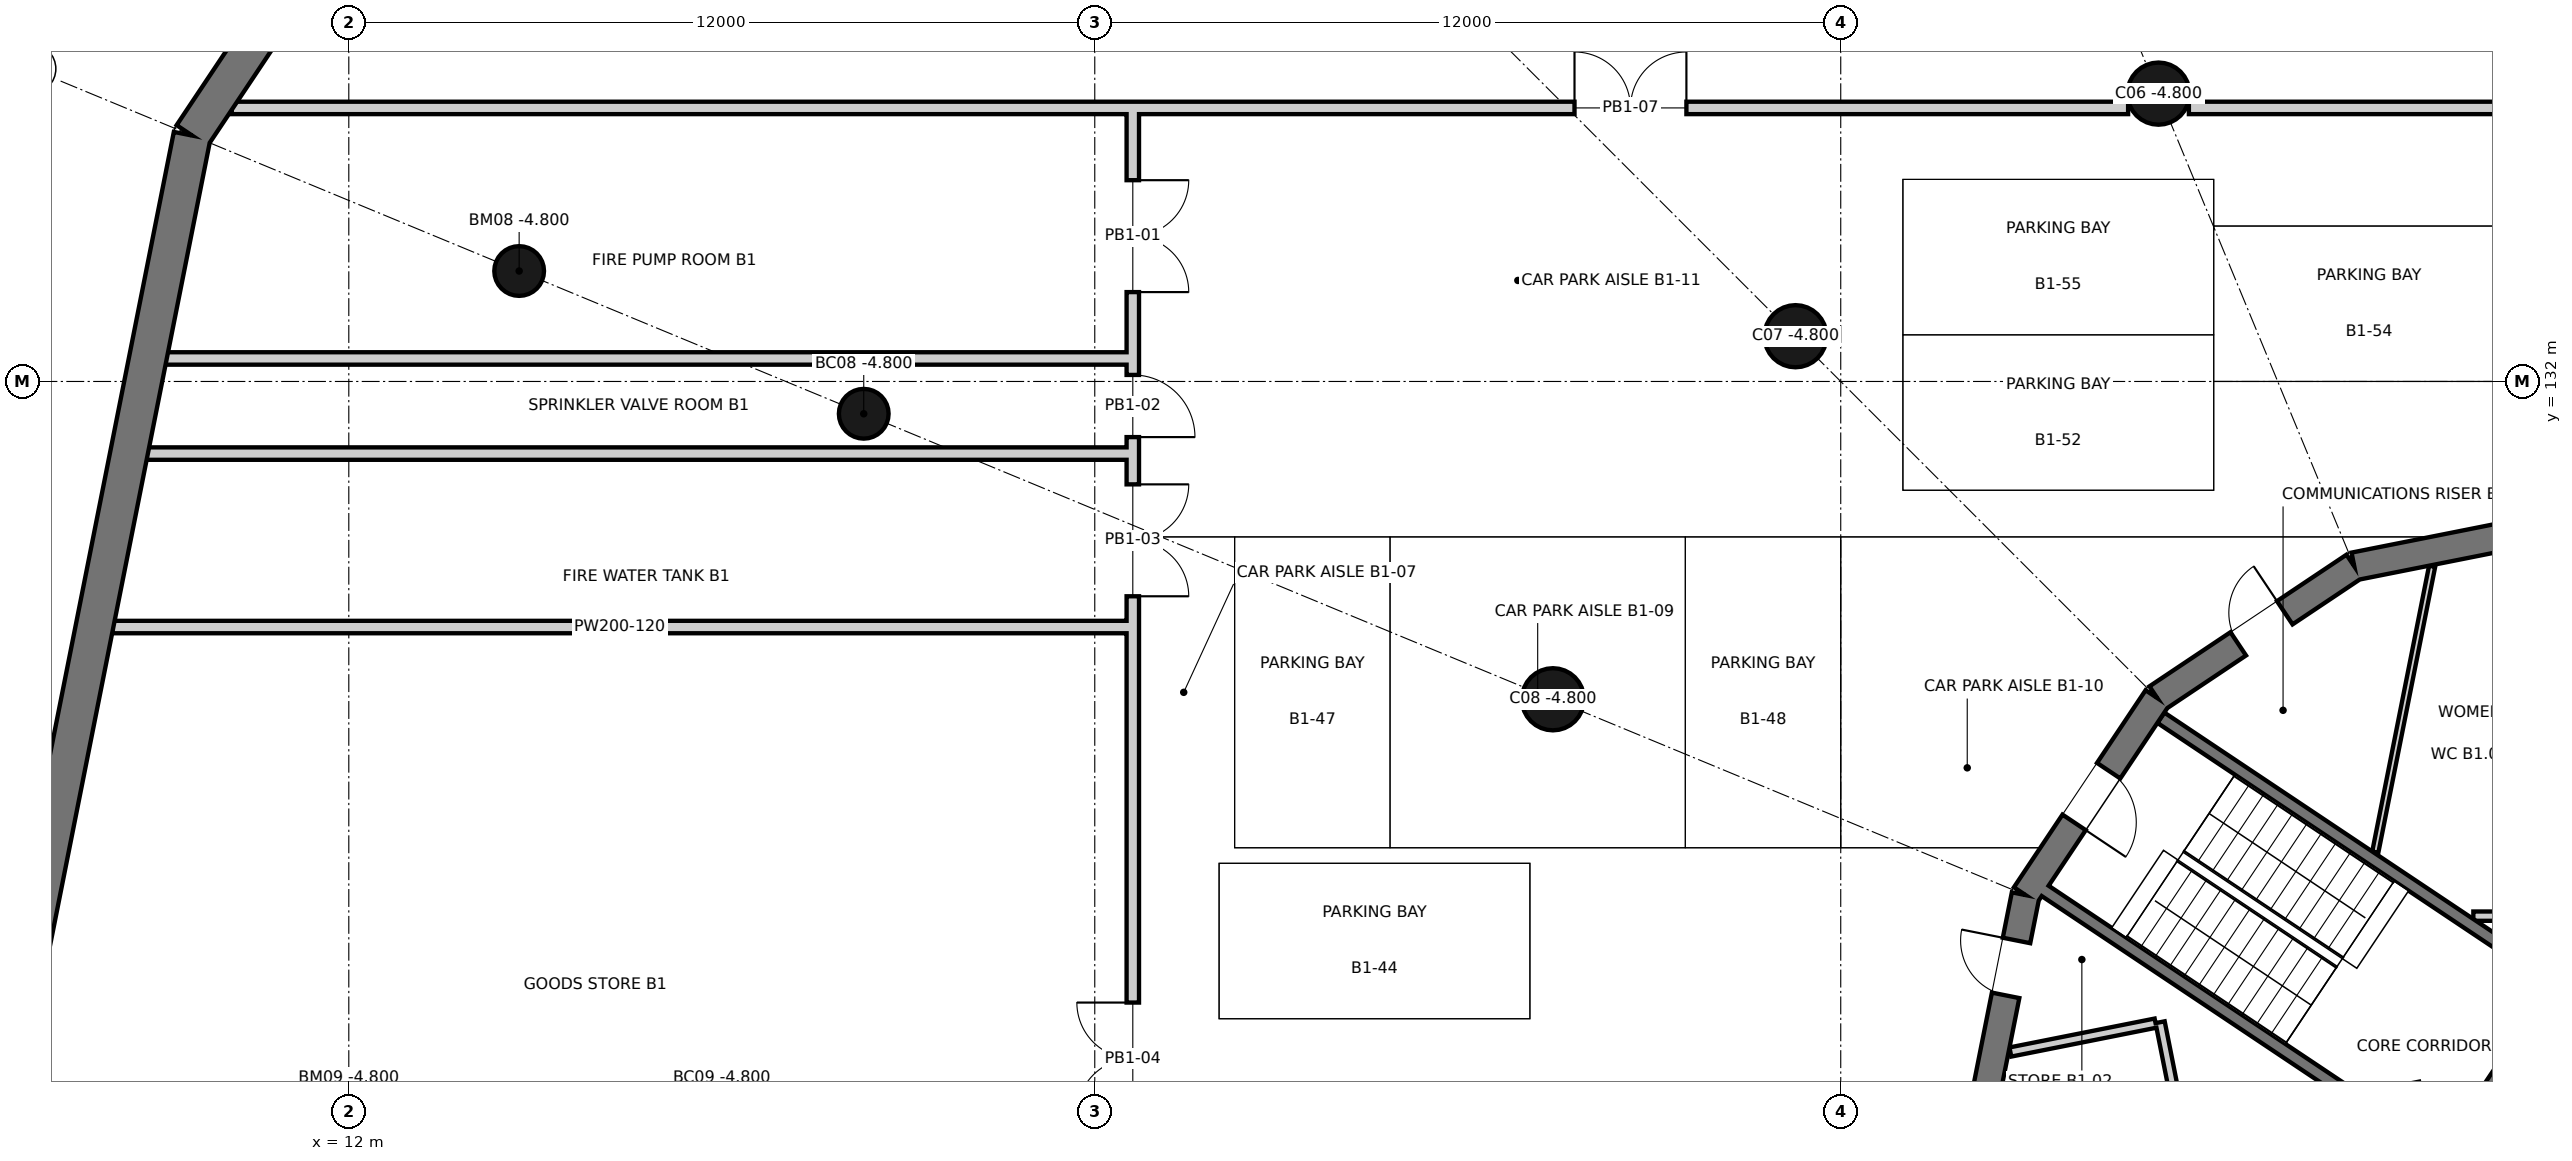
"""IFC4 building model, lengths in metres.
Left out: names, types, materials, properties, quantities, classifications, styles, units other than length and angle.
Written with IfcOpenShell. Run it as: python <this file> out.ifc"""

import sys

from ifc_helpers import new_model, si_unit, direction, frame, frame_2d, origin, origin_2d, place, context, subcontext, project, spatial, polyline, rectangle, circle, outline, extrude, element, fill, save


model = new_model("IFC4")
c1 = context("Model", 3, precision=1e-05, world=origin(), true_north=direction((0.0, 1.0)))
c2 = subcontext(c1, "Body", "Model", "MODEL_VIEW")
j1 = project(units=[si_unit("LENGTHUNIT", "METRE"), si_unit("PLANEANGLEUNIT", "RADIAN")], contexts=[c1])
p1 = place(None, origin())
s1 = spatial("IfcSite", under=j1, at=p1, CompositionType="ELEMENT")
p2 = place(p1, origin())
s2 = spatial("IfcBuilding", under=s1, at=p2, CompositionType="ELEMENT")
p3 = place(p2, frame((0.0, 0.0, -4.2)))
s3 = spatial("IfcBuildingStorey", under=s2, at=p3, CompositionType="ELEMENT", Elevation=-4.2)
p4 = place(p3, frame((48.0, 129.771, -0.6), z_axis=(0.0, 0.0, 1.0), x_axis=(-0.98078948206, -0.195069197673, 0.0)))
e1 = element("IfcWall", 1, at=p4, inside=s3, PredefinedType="SHEAR", context=c2, shape_type="SweptSolid", body=[
    extrude(outline(polyline([(-0.045, -0.225), (3.857, -0.225), (3.768, 0.225), (0.045, 0.225), (-0.045, -0.225)])), origin(), (0.0, 0.0, 1.0), 4.8),
])
p5 = place(p3, frame((44.261, 129.027, -0.6), z_axis=(0.0, 0.0, 1.0), x_axis=(-0.83148829117, -0.555542277102, 0.0)))
e2 = element("IfcWall", 2, at=p5, inside=s3, PredefinedType="SHEAR", context=c2, shape_type="SweptSolid", body=[
    extrude(outline(polyline([(-0.045, -0.225), (3.857, -0.225), (3.768, 0.225), (0.045, 0.225), (-0.045, -0.225)])), origin(), (0.0, 0.0, 1.0), 4.8),
])
p6 = place(p5, frame((1.345, 0.0, 0.6)))
e3 = element("IfcOpeningElement", 3, at=p6, cuts=e2, PredefinedType="OPENING", context=c2, shape_type="SweptSolid", body=[
    extrude(rectangle(XDim=0.9, YDim=2.1, at=frame_2d((0.45, 1.05))), frame((0.0, 0.235, 0.0), z_axis=(0.0, -1.0, 0.0), x_axis=(1.0, 0.0, 0.0)), (0.0, 0.0, 1.0), 0.47),
])
p7 = place(p3, frame((41.091, 126.909, -0.6), z_axis=(0.0, 0.0, 1.0), x_axis=(-0.555542277102, -0.83148829117, 0.0)))
e4 = element("IfcWall", 4, at=p7, inside=s3, PredefinedType="SHEAR", context=c2, shape_type="SweptSolid", body=[
    extrude(outline(polyline([(-0.045, -0.225), (3.857, -0.225), (3.768, 0.225), (0.045, 0.225), (-0.045, -0.225)])), origin(), (0.0, 0.0, 1.0), 4.8),
])
p8 = place(p7, frame((1.406, 0.0, 0.6)))
e5 = element("IfcOpeningElement", 5, at=p8, cuts=e4, PredefinedType="OPENING", context=c2, shape_type="SweptSolid", body=[
    extrude(rectangle(XDim=1.0, YDim=2.1, at=frame_2d((0.5, 1.05))), frame((0.0, 0.235, 0.0), z_axis=(0.0, -1.0, 0.0), x_axis=(1.0, 0.0, 0.0)), (0.0, 0.0, 1.0), 0.47),
])
p9 = place(p3, frame((38.973, 123.739, -0.6), z_axis=(0.0, 0.0, 1.0), x_axis=(-0.195069197673, -0.98078948206, 0.0)))
e6 = element("IfcWall", 6, at=p9, inside=s3, PredefinedType="SHEAR", context=c2, shape_type="SweptSolid", body=[
    extrude(outline(polyline([(-0.045, -0.225), (3.857, -0.225), (3.768, 0.225), (0.045, 0.225), (-0.045, -0.225)])), origin(), (0.0, 0.0, 1.0), 4.8),
])
p10 = place(p9, frame((0.745, 0.0, 0.6)))
e7 = element("IfcOpeningElement", 7, at=p10, cuts=e6, PredefinedType="OPENING", context=c2, shape_type="SweptSolid", body=[
    extrude(rectangle(XDim=0.9, YDim=2.1, at=frame_2d((0.45, 1.05))), frame((0.0, 0.235, 0.0), z_axis=(0.0, -1.0, 0.0), x_axis=(1.0, 0.0, 0.0)), (0.0, 0.0, 1.0), 0.47),
])
p11 = place(p3, frame((45.774, 119.473, -0.6), z_axis=(0.0, 0.0, 1.0), x_axis=(-0.831486463828, 0.555545012102, 0.0)))
e8 = element("IfcWall", 8, at=p11, inside=s3, PredefinedType="SHEAR", context=c2, shape_type="SweptSolid", body=[
    extrude(rectangle(XDim=7.8, YDim=0.2, at=frame_2d((3.9, 0.0))), origin(), (0.0, 0.0, 1.0), 4.8),
])
p12 = place(p3, frame((47.635, 122.258, -0.6), z_axis=(0.0, 0.0, 1.0), x_axis=(-0.831476803301, 0.555559470779, 0.0)))
e9 = element("IfcWall", 9, at=p12, inside=s3, PredefinedType="SHEAR", context=c2, shape_type="SweptSolid", body=[
    extrude(rectangle(XDim=7.8, YDim=0.2, at=frame_2d((3.9, 0.0))), origin(), (0.0, 0.0, 1.0), 4.8),
])
p13 = place(p3, frame((47.497, 122.231, -0.6), z_axis=(0.0, 0.0, 1.0), x_axis=(-0.55555842186, -0.831477504146, 0.0)))
e10 = element("IfcWall", 10, at=p13, inside=s3, PredefinedType="SHEAR", context=c2, shape_type="SweptSolid", body=[
    extrude(rectangle(XDim=3.15, YDim=0.2, at=frame_2d((1.575, 0.0))), origin(), (0.0, 0.0, 1.0), 4.8),
])
for number, where, z_axis, x_axis in (
    (11, (41.112, 136.63, -0.6), (0.0, 0.0, 1.0), (1.0, 0.0, 0.0)),
    (12, (35.272, 132.728, -0.6), (0.0, 0.0, 1.0), (1.0, 0.0, 0.0)),
    (13, (31.37, 126.888, -0.6), (0.0, 0.0, 1.0), (1.0, 0.0, 0.0)),
):
    element("IfcColumn", number, at=place(p3, frame(where, z_axis=z_axis, x_axis=x_axis)), inside=s3, PredefinedType="COLUMN", context=c2, shape_type="SweptSolid", body=[
        extrude(circle(Radius=0.5, at=origin_2d()), origin(), (0.0, 0.0, 1.0), 4.8),
    ])
for number, where, z_axis, x_axis in (
    (14, (20.284, 131.48, -0.6), (0.0, 0.0, 1.0), (1.0, 0.0, 0.0)),
    (15, (14.74, 133.777, -0.6), (0.0, 0.0, 1.0), (1.0, 0.0, 0.0)),
):
    element("IfcColumn", number, at=place(p3, frame(where, z_axis=z_axis, x_axis=x_axis)), inside=s3, PredefinedType="COLUMN", context=c2, shape_type="SweptSolid", body=[
        extrude(circle(Radius=0.4, at=origin_2d()), origin(), (0.0, 0.0, 1.0), 4.35),
    ])
p14 = place(p3, frame((18.518, 149.482, -0.6), z_axis=(0.0, 0.0, 1.0), x_axis=(-0.555565694596, -0.831472644762, 0.0)))
e16 = element("IfcWall", 16, at=p14, inside=s3, PredefinedType="SOLIDWALL", context=c2, shape_type="SweptSolid", body=[
    extrude(outline(polyline([(-0.06, -0.3), (16.328, -0.3), (16.209, 0.3), (0.06, 0.3), (-0.06, -0.3)])), origin(), (0.0, 0.0, 1.0), 4.8),
])
p15 = place(p3, frame((9.48, 135.956, -0.6), z_axis=(0.0, 0.0, 1.0), x_axis=(-0.195094380607, -0.980784473091, 0.0)))
e17 = element("IfcWall", 17, at=p15, inside=s3, PredefinedType="SOLIDWALL", context=c2, shape_type="SweptSolid", body=[
    extrude(outline(polyline([(-0.06, -0.3), (16.328, -0.3), (16.208, 0.3), (0.06, 0.3), (-0.06, -0.3)])), origin(), (0.0, 0.0, 1.0), 4.8),
])
p16 = place(p3, frame((41.479, 119.977, 0.0), z_axis=(0.0, 0.0, 1.0), x_axis=(-0.19501613536, 0.98080003413, 0.0)))
e18 = element("IfcWall", 18, at=p16, inside=s3, PredefinedType="PARTITIONING", context=c2, shape_type="SweptSolid", body=[
    extrude(rectangle(XDim=1.75, YDim=0.15, at=frame_2d((0.875, 0.0))), origin(), (0.0, 0.0, 1.0), 3.85),
])
p17 = place(p3, frame((41.064, 121.679, 0.0), z_axis=(0.0, 0.0, 1.0), x_axis=(-0.980781272394, -0.195110470559, 0.0)))
e19 = element("IfcWall", 19, at=p17, inside=s3, PredefinedType="PARTITIONING", context=c2, shape_type="SweptSolid", body=[
    extrude(rectangle(XDim=2.381, YDim=0.15, at=frame_2d((1.19, 0.0))), origin(), (0.0, 0.0, 1.0), 3.85),
])
p18 = place(p3, frame((47.301, 123.4, 0.0), z_axis=(0.0, 0.0, 1.0), x_axis=(-1.0, 0.0, 0.0)))
e20 = element("IfcWall", 20, at=p18, inside=s3, PredefinedType="PARTITIONING", context=c2, shape_type="SweptSolid", body=[
    extrude(rectangle(XDim=1.124, YDim=0.15, at=frame_2d((0.562, 0.0))), origin(), (0.0, 0.0, 1.0), 3.85),
])
p19 = place(p3, frame((44.599, 124.43, 0.0), z_axis=(0.0, 0.0, 1.0), x_axis=(0.195074516154, 0.980788424252, 0.0)))
e21 = element("IfcWall", 21, at=p19, inside=s3, PredefinedType="PARTITIONING", context=c2, shape_type="SweptSolid", body=[
    extrude(rectangle(XDim=4.688, YDim=0.1, at=frame_2d((2.344, 0.0))), origin(), (0.0, 0.0, 1.0), 3.85),
])
p20 = place(p3, frame((24.517, 132.37, 0.0), z_axis=(0.0, 0.0, 1.0), x_axis=(-1.0, 0.0, 0.0)))
e22 = element("IfcWall", 22, at=p20, inside=s3, PredefinedType="SOLIDWALL", context=c2, shape_type="SweptSolid", body=[
    extrude(rectangle(XDim=15.465, YDim=0.2, at=frame_2d((7.732, 0.0))), origin(), (0.0, 0.0, 1.0), 3.75),
])
p21 = place(p3, frame((10.117, 136.4, 0.0), z_axis=(0.0, 0.0, 1.0), x_axis=(1.0, 0.0, 0.0)))
e23 = element("IfcWall", 23, at=p21, inside=s3, PredefinedType="SOLIDWALL", context=c2, shape_type="SweptSolid", body=[
    extrude(rectangle(XDim=14.495, YDim=0.2, at=frame_2d((7.247, 0.0))), origin(), (0.0, 0.0, 1.0), 3.75),
])
p22 = place(p3, frame((24.612, 136.305, 0.0), z_axis=(0.0, 0.0, 1.0), x_axis=(0.0, -1.0, 0.0)))
e24 = element("IfcWall", 24, at=p22, inside=s3, PredefinedType="SOLIDWALL", context=c2, shape_type="SweptSolid", body=[
    extrude(rectangle(XDim=3.935, YDim=0.2, at=frame_2d((1.967, 0.0))), origin(), (0.0, 0.0, 1.0), 3.75),
])
p23 = place(p22, frame((1.067, 0.0, 0.0)))
e25 = element("IfcOpeningElement", 25, at=p23, cuts=e24, PredefinedType="OPENING", context=c2, shape_type="SweptSolid", body=[
    extrude(rectangle(XDim=1.8, YDim=2.1, at=frame_2d((0.9, 1.05))), frame((0.0, 0.11, 0.0), z_axis=(0.0, -1.0, 0.0), x_axis=(1.0, 0.0, 0.0)), (0.0, 0.0, 1.0), 0.22),
])
p24 = place(p3, frame((24.517, 130.84, 0.0), z_axis=(0.0, 0.0, 1.0), x_axis=(-1.0, 0.0, 0.0)))
e26 = element("IfcWall", 26, at=p24, inside=s3, PredefinedType="SOLIDWALL", context=c2, shape_type="SweptSolid", body=[
    extrude(rectangle(XDim=15.769, YDim=0.2, at=frame_2d((7.885, 0.0))), origin(), (0.0, 0.0, 1.0), 3.75),
])
p25 = place(p3, frame((24.612, 132.37, 0.0), z_axis=(0.0, 0.0, 1.0), x_axis=(0.0, -1.0, 0.0)))
e27 = element("IfcWall", 27, at=p25, inside=s3, PredefinedType="SOLIDWALL", context=c2, shape_type="SweptSolid", body=[
    extrude(rectangle(XDim=1.53, YDim=0.2, at=frame_2d((0.765, 0.0))), origin(), (0.0, 0.0, 1.0), 3.75),
])
p26 = place(p25, frame((0.265, 0.0, 0.0)))
e28 = element("IfcOpeningElement", 28, at=p26, cuts=e27, PredefinedType="OPENING", context=c2, shape_type="SweptSolid", body=[
    extrude(rectangle(XDim=1.0, YDim=2.1, at=frame_2d((0.5, 1.05))), frame((0.0, 0.11, 0.0), z_axis=(0.0, -1.0, 0.0), x_axis=(1.0, 0.0, 0.0)), (0.0, 0.0, 1.0), 0.22),
])
p27 = place(p3, frame((24.517, 128.05, 0.0), z_axis=(0.0, 0.0, 1.0), x_axis=(-1.0, 0.0, 0.0)))
e29 = element("IfcWall", 29, at=p27, inside=s3, PredefinedType="SOLIDWALL", context=c2, shape_type="SweptSolid", body=[
    extrude(rectangle(XDim=16.324, YDim=0.2, at=frame_2d((8.162, 0.0))), origin(), (0.0, 0.0, 1.0), 3.75),
])
p28 = place(p3, frame((24.612, 130.84, 0.0), z_axis=(0.0, 0.0, 1.0), x_axis=(0.0, -1.0, 0.0)))
e30 = element("IfcWall", 30, at=p28, inside=s3, PredefinedType="SOLIDWALL", context=c2, shape_type="SweptSolid", body=[
    extrude(rectangle(XDim=2.79, YDim=0.2, at=frame_2d((1.395, 0.0))), origin(), (0.0, 0.0, 1.0), 3.75),
])
p29 = place(p28, frame((0.495, 0.0, 0.0)))
e31 = element("IfcOpeningElement", 31, at=p29, cuts=e30, PredefinedType="OPENING", context=c2, shape_type="SweptSolid", body=[
    extrude(rectangle(XDim=1.8, YDim=2.1, at=frame_2d((0.9, 1.05))), frame((0.0, 0.11, 0.0), z_axis=(0.0, -1.0, 0.0), x_axis=(1.0, 0.0, 0.0)), (0.0, 0.0, 1.0), 0.22),
])
p30 = place(p3, frame((24.612, 128.05, 0.0), z_axis=(0.0, 0.0, 1.0), x_axis=(0.0, -1.0, 0.0)))
e32 = element("IfcWall", 32, at=p30, inside=s3, PredefinedType="SOLIDWALL", context=c2, shape_type="SweptSolid", body=[
    extrude(rectangle(XDim=13.88, YDim=0.2, at=frame_2d((6.94, 0.0))), origin(), (0.0, 0.0, 1.0), 3.75),
])
p31 = place(p30, frame((6.04, 0.0, 0.0)))
e33 = element("IfcOpeningElement", 33, at=p31, cuts=e32, PredefinedType="OPENING", context=c2, shape_type="SweptSolid", body=[
    extrude(rectangle(XDim=1.8, YDim=2.1, at=frame_2d((0.9, 1.05))), frame((0.0, 0.11, 0.0), z_axis=(0.0, -1.0, 0.0), x_axis=(1.0, 0.0, 0.0)), (0.0, 0.0, 1.0), 0.22),
])
p32 = place(p3, frame((40.623, 136.4, 0.0), z_axis=(0.0, 0.0, 1.0), x_axis=(-1.0, 0.0, 0.0)))
e34 = element("IfcWall", 34, at=p32, inside=s3, PredefinedType="SOLIDWALL", context=c2, shape_type="SweptSolid", body=[
    extrude(rectangle(XDim=16.011, YDim=0.2, at=frame_2d((8.005, 0.0))), origin(), (0.0, 0.0, 1.0), 3.75),
])
p33 = place(p32, frame((7.105, 0.0, 0.0)))
e35 = element("IfcOpeningElement", 35, at=p33, cuts=e34, PredefinedType="OPENING", context=c2, shape_type="SweptSolid", body=[
    extrude(rectangle(XDim=1.8, YDim=2.1, at=frame_2d((0.9, 1.05))), frame((0.0, 0.11, 0.0), z_axis=(0.0, -1.0, 0.0), x_axis=(1.0, 0.0, 0.0)), (0.0, 0.0, 1.0), 0.22),
])
p34 = place(p3, frame((49.1, 136.4, 0.0), z_axis=(0.0, 0.0, 1.0), x_axis=(-1.0, 0.0, 0.0)))
e36 = element("IfcWall", 36, at=p34, inside=s3, PredefinedType="SOLIDWALL", context=c2, shape_type="SweptSolid", body=[
    extrude(rectangle(XDim=7.5, YDim=0.2, at=frame_2d((3.75, 0.0))), origin(), (0.0, 0.0, 1.0), 3.85),
])
p35 = place(p8, origin())
e37 = element("IfcDoor", 37, at=p35, inside=s3, OperationType="SINGLE_SWING_RIGHT", PredefinedType="DOOR", context=c2, shape_type="SweptSolid", body=[
    extrude(rectangle(XDim=1.0, YDim=2.1, at=frame_2d((0.5, 1.05))), frame((0.0, 0.025, 0.0), z_axis=(0.0, -1.0, 0.0), x_axis=(1.0, 0.0, 0.0)), (0.0, 0.0, 1.0), 0.05),
])
fill(e5, e37)
p36 = place(p6, frame((0.9, 0.0, 0.0), z_axis=(0.0, 0.0, 1.0), x_axis=(-1.0, 0.0, 0.0)))
e38 = element("IfcDoor", 38, at=p36, inside=s3, OperationType="SINGLE_SWING_RIGHT", PredefinedType="DOOR", context=c2, shape_type="SweptSolid", body=[
    extrude(rectangle(XDim=0.9, YDim=2.1, at=frame_2d((0.45, 1.05))), frame((0.0, 0.025, 0.0), z_axis=(0.0, -1.0, 0.0), x_axis=(1.0, 0.0, 0.0)), (0.0, 0.0, 1.0), 0.05),
])
fill(e3, e38)
p37 = place(p10, frame((0.9, 0.0, 0.0), z_axis=(0.0, 0.0, 1.0), x_axis=(-1.0, 0.0, 0.0)))
e39 = element("IfcDoor", 39, at=p37, inside=s3, OperationType="SINGLE_SWING_RIGHT", PredefinedType="DOOR", context=c2, shape_type="SweptSolid", body=[
    extrude(rectangle(XDim=0.9, YDim=2.1, at=frame_2d((0.45, 1.05))), frame((0.0, 0.025, 0.0), z_axis=(0.0, -1.0, 0.0), x_axis=(1.0, 0.0, 0.0)), (0.0, 0.0, 1.0), 0.05),
])
fill(e7, e39)
p38 = place(p23, origin())
e40 = element("IfcDoor", 40, at=p38, inside=s3, OperationType="DOUBLE_DOOR_SINGLE_SWING", PredefinedType="DOOR", context=c2, shape_type="SweptSolid", body=[
    extrude(rectangle(XDim=1.8, YDim=2.1, at=frame_2d((0.9, 1.05))), frame((0.0, 0.025, 0.0), z_axis=(0.0, -1.0, 0.0), x_axis=(1.0, 0.0, 0.0)), (0.0, 0.0, 1.0), 0.05),
])
fill(e25, e40)
p39 = place(p26, origin())
e41 = element("IfcDoor", 41, at=p39, inside=s3, OperationType="SINGLE_SWING_RIGHT", PredefinedType="DOOR", context=c2, shape_type="SweptSolid", body=[
    extrude(rectangle(XDim=1.0, YDim=2.1, at=frame_2d((0.5, 1.05))), frame((0.0, 0.025, 0.0), z_axis=(0.0, -1.0, 0.0), x_axis=(1.0, 0.0, 0.0)), (0.0, 0.0, 1.0), 0.05),
])
fill(e28, e41)
p40 = place(p29, origin())
e42 = element("IfcDoor", 42, at=p40, inside=s3, OperationType="DOUBLE_DOOR_SINGLE_SWING", PredefinedType="DOOR", context=c2, shape_type="SweptSolid", body=[
    extrude(rectangle(XDim=1.8, YDim=2.1, at=frame_2d((0.9, 1.05))), frame((0.0, 0.025, 0.0), z_axis=(0.0, -1.0, 0.0), x_axis=(1.0, 0.0, 0.0)), (0.0, 0.0, 1.0), 0.05),
])
fill(e31, e42)
p41 = place(p31, frame((1.8, 0.0, 0.0), z_axis=(0.0, 0.0, 1.0), x_axis=(-1.0, 0.0, 0.0)))
e43 = element("IfcDoor", 43, at=p41, inside=s3, OperationType="DOUBLE_DOOR_SINGLE_SWING", PredefinedType="DOOR", context=c2, shape_type="SweptSolid", body=[
    extrude(rectangle(XDim=1.8, YDim=2.1, at=frame_2d((0.9, 1.05))), frame((0.0, 0.025, 0.0), z_axis=(0.0, -1.0, 0.0), x_axis=(1.0, 0.0, 0.0)), (0.0, 0.0, 1.0), 0.05),
])
fill(e33, e43)
p42 = place(p33, frame((1.8, 0.0, 0.0), z_axis=(0.0, 0.0, 1.0), x_axis=(-1.0, 0.0, 0.0)))
e44 = element("IfcDoor", 44, at=p42, inside=s3, OperationType="DOUBLE_DOOR_SINGLE_SWING", PredefinedType="DOOR", context=c2, shape_type="SweptSolid", body=[
    extrude(rectangle(XDim=1.8, YDim=2.1, at=frame_2d((0.9, 1.05))), frame((0.0, 0.025, 0.0), z_axis=(0.0, -1.0, 0.0), x_axis=(1.0, 0.0, 0.0)), (0.0, 0.0, 1.0), 0.05),
])
fill(e35, e44)
save(model, sys.argv[1])
